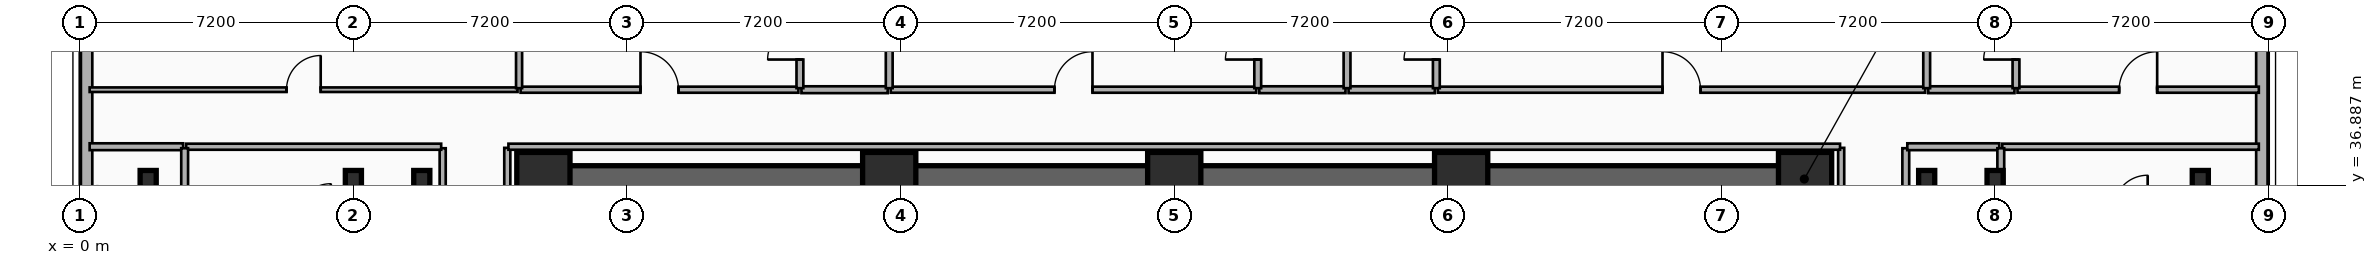
"""IFC4 building model, lengths in metres.
Left out: names, types, materials, properties, quantities, classifications, styles, units other than length and angle.
Written with IfcOpenShell. Run it as: python <this file> out.ifc"""

import sys

from ifc_helpers import new_model, si_unit, direction, frame, frame_2d, origin, origin_2d, place, context, subcontext, project, spatial, rectangle, i_section, extrude, element, fill, save


model = new_model("IFC4")
c1 = context("Model", 3, precision=1e-05, world=origin(), true_north=direction((0.0, 1.0)))
c2 = subcontext(c1, "Body", "Model", "MODEL_VIEW")
j1 = project(units=[si_unit("LENGTHUNIT", "METRE"), si_unit("PLANEANGLEUNIT", "RADIAN")], contexts=[c1])
p1 = place(None, origin())
s1 = spatial("IfcSite", under=j1, at=p1, CompositionType="ELEMENT")
p2 = place(p1, origin())
s2 = spatial("IfcBuilding", under=s1, at=p2, CompositionType="ELEMENT")
p3 = place(p2, frame((0.0, 0.0, 50.0)))
s3 = spatial("IfcBuildingStorey", under=s2, at=p3, CompositionType="ELEMENT", Elevation=50.0)
p4 = place(p3, frame((12.15, 37.05, 0.0), z_axis=(0.0, 0.0, 1.0), x_axis=(1.0, 0.0, 0.0)))
e1 = element("IfcWall", 1, at=p4, inside=s3, PredefinedType="SHEAR", context=c2, shape_type="SweptSolid", body=[
    extrude(rectangle(XDim=33.23, YDim=0.7, at=frame_2d((16.615, 0.0))), origin(), (0.0, 0.0, 1.0), 3.5),
])
for number, where, z_axis, x_axis in (
    (2, (12.2, 37.05, 0.0), (0.0, 0.0, 1.0), (1.0, 0.0, 0.0)),
    (3, (21.3, 37.05, 0.0), (0.0, 0.0, 1.0), (1.0, 0.0, 0.0)),
    (4, (28.8, 37.05, 0.0), (0.0, 0.0, 1.0), (1.0, 0.0, 0.0)),
    (5, (36.35, 37.05, 0.0), (0.0, 0.0, 1.0), (1.0, 0.0, 0.0)),
    (6, (45.4, 37.05, 0.0), (0.0, 0.0, 1.0), (1.0, 0.0, 0.0)),
):
    element("IfcColumn", number, at=place(p3, frame(where, z_axis=z_axis, x_axis=x_axis)), inside=s3, PredefinedType="COLUMN", context=c2, shape_type="SweptSolid", body=[
        extrude(rectangle(XDim=1.4, YDim=1.4, at=origin_2d()), origin(), (0.0, 0.0, 1.0), 3.5),
    ])
for number, where, z_axis, x_axis in (
    (7, (9.0, 37.05, 0.0), (0.0, 0.0, 1.0), (1.0, 0.0, 0.0)),
    (8, (48.6, 37.05, 0.0), (0.0, 0.0, 1.0), (1.0, 0.0, 0.0)),
    (9, (1.8, 37.05, 0.0), (0.0, 0.0, 1.0), (1.0, 0.0, 0.0)),
    (10, (7.2, 37.05, 0.0), (0.0, 0.0, 1.0), (1.0, 0.0, 0.0)),
    (11, (50.4, 37.05, 0.0), (0.0, 0.0, 1.0), (1.0, 0.0, 0.0)),
    (12, (55.8, 37.05, 0.0), (0.0, 0.0, 1.0), (1.0, 0.0, 0.0)),
):
    element("IfcColumn", number, at=place(p3, frame(where, z_axis=z_axis, x_axis=x_axis)), inside=s3, PredefinedType="COLUMN", context=c2, shape_type="SweptSolid", body=[
        extrude(i_section(OverallWidth=0.424, OverallDepth=0.45, WebThickness=0.041, FlangeThickness=0.065, FilletRadius=0.015, at=origin_2d()), origin(), (0.0, 0.0, 1.0), 3.5),
    ])
p5 = place(p3, frame((57.42, 41.0, 0.0), z_axis=(0.0, 0.0, 1.0), x_axis=(0.0, -1.0, 0.0)))
e13 = element("IfcWall", 13, at=p5, inside=s3, PredefinedType="SOLIDWALL", context=c2, shape_type="SweptSolid", body=[
    extrude(rectangle(XDim=15.2, YDim=0.3, at=frame_2d((7.6, 0.0))), origin(), (0.0, 0.0, 1.0), 3.24),
])
p6 = place(p5, frame((10.882, 0.0, 0.48)))
e14 = element("IfcOpeningElement", 14, at=p6, cuts=e13, PredefinedType="OPENING", context=c2, shape_type="SweptSolid", body=[
    extrude(rectangle(XDim=1.4, YDim=1.8, at=frame_2d((0.7, 0.9))), frame((0.0, 0.16, 0.0), z_axis=(0.0, -1.0, 0.0), x_axis=(1.0, 0.0, 0.0)), (0.0, 0.0, 1.0), 0.32),
])
p7 = place(p5, frame((5.621, 0.0, 0.48)))
e15 = element("IfcOpeningElement", 15, at=p7, cuts=e13, PredefinedType="OPENING", context=c2, shape_type="SweptSolid", body=[
    extrude(rectangle(XDim=1.4, YDim=1.8, at=frame_2d((0.7, 0.9))), frame((0.0, 0.16, 0.0), z_axis=(0.0, -1.0, 0.0), x_axis=(1.0, 0.0, 0.0)), (0.0, 0.0, 1.0), 0.32),
])
p8 = place(p3, frame((0.18, 25.8, 0.0), z_axis=(0.0, 0.0, 1.0), x_axis=(0.0, 1.0, 0.0)))
e16 = element("IfcWall", 16, at=p8, inside=s3, PredefinedType="SOLIDWALL", context=c2, shape_type="SweptSolid", body=[
    extrude(rectangle(XDim=15.2, YDim=0.3, at=frame_2d((7.6, 0.0))), origin(), (0.0, 0.0, 1.0), 3.24),
])
p9 = place(p8, frame((2.67, 0.0, 0.48)))
e17 = element("IfcOpeningElement", 17, at=p9, cuts=e16, PredefinedType="OPENING", context=c2, shape_type="SweptSolid", body=[
    extrude(rectangle(XDim=1.4, YDim=1.8, at=frame_2d((0.7, 0.9))), frame((0.0, 0.16, 0.0), z_axis=(0.0, -1.0, 0.0), x_axis=(1.0, 0.0, 0.0)), (0.0, 0.0, 1.0), 0.32),
])
p10 = place(p8, frame((7.709, 0.0, 0.48)))
e18 = element("IfcOpeningElement", 18, at=p10, cuts=e16, PredefinedType="OPENING", context=c2, shape_type="SweptSolid", body=[
    extrude(rectangle(XDim=1.4, YDim=1.8, at=frame_2d((0.7, 0.9))), frame((0.0, 0.16, 0.0), z_axis=(0.0, -1.0, 0.0), x_axis=(1.0, 0.0, 0.0)), (0.0, 0.0, 1.0), 0.32),
])
p11 = place(p3, frame((9.55, 36.067, 0.0), z_axis=(0.0, 0.0, 1.0), x_axis=(0.0, 1.0, 0.0)))
e19 = element("IfcWall", 19, at=p11, inside=s3, PredefinedType="PARTITIONING", context=c2, shape_type="SweptSolid", body=[
    extrude(rectangle(XDim=1.793, YDim=0.16, at=frame_2d((0.896, 0.0))), origin(), (0.0, 0.0, 1.0), 2.72),
])
p12 = place(p3, frame((48.05, 36.29, 0.0), z_axis=(0.0, 0.0, 1.0), x_axis=(0.0, 1.0, 0.0)))
e20 = element("IfcWall", 20, at=p12, inside=s3, PredefinedType="PLUMBINGWALL", context=c2, shape_type="SweptSolid", body=[
    extrude(rectangle(XDim=1.57, YDim=0.18, at=frame_2d((0.785, 0.0))), origin(), (0.0, 0.0, 1.0), 2.72),
])
p13 = place(p3, frame((0.26, 37.9, 0.0), z_axis=(0.0, 0.0, 1.0), x_axis=(1.0, 0.0, 0.0)))
e21 = element("IfcWall", 21, at=p13, inside=s3, PredefinedType="PLUMBINGWALL", context=c2, shape_type="SweptSolid", body=[
    extrude(rectangle(XDim=2.46, YDim=0.18, at=frame_2d((1.23, 0.0))), origin(), (0.0, 0.0, 1.0), 3.24),
])
p14 = place(p3, frame((2.8, 37.9, 0.0), z_axis=(0.0, 0.0, 1.0), x_axis=(1.0, 0.0, 0.0)))
e22 = element("IfcWall", 22, at=p14, inside=s3, PredefinedType="PARTITIONING", context=c2, shape_type="SweptSolid", body=[
    extrude(rectangle(XDim=6.71, YDim=0.16, at=frame_2d((3.355, 0.0))), origin(), (0.0, 0.0, 1.0), 3.24),
])
p15 = place(p3, frame((48.09, 37.9, 0.0), z_axis=(0.0, 0.0, 1.0), x_axis=(1.0, 0.0, 0.0)))
e23 = element("IfcWall", 23, at=p15, inside=s3, PredefinedType="PLUMBINGWALL", context=c2, shape_type="SweptSolid", body=[
    extrude(rectangle(XDim=2.42, YDim=0.18, at=frame_2d((1.21, 0.0))), origin(), (0.0, 0.0, 1.0), 3.24),
])
p16 = place(p3, frame((50.59, 37.9, 0.0), z_axis=(0.0, 0.0, 1.0), x_axis=(1.0, 0.0, 0.0)))
e24 = element("IfcWall", 24, at=p16, inside=s3, PredefinedType="PARTITIONING", context=c2, shape_type="SweptSolid", body=[
    extrude(rectangle(XDim=6.75, YDim=0.16, at=frame_2d((3.375, 0.0))), origin(), (0.0, 0.0, 1.0), 3.24),
])
p17 = place(p3, frame((0.26, 39.4, 0.0), z_axis=(0.0, 0.0, 1.0), x_axis=(1.0, 0.0, 0.0)))
e25 = element("IfcWall", 25, at=p17, inside=s3, PredefinedType="PARTITIONING", context=c2, shape_type="SweptSolid", body=[
    extrude(rectangle(XDim=11.26, YDim=0.12, at=frame_2d((5.63, 0.0))), origin(), (0.0, 0.0, 1.0), 3.24),
])
p18 = place(p17, frame((5.18, 0.0, 0.0)))
e26 = element("IfcOpeningElement", 26, at=p18, cuts=e25, PredefinedType="OPENING", context=c2, shape_type="SweptSolid", body=[
    extrude(rectangle(XDim=0.9, YDim=2.1, at=frame_2d((0.45, 1.05))), frame((0.0, 0.07, 0.0), z_axis=(0.0, -1.0, 0.0), x_axis=(1.0, 0.0, 0.0)), (0.0, 0.0, 1.0), 0.14),
])
p19 = place(p3, frame((11.6, 39.4, 0.0), z_axis=(0.0, 0.0, 1.0), x_axis=(1.0, 0.0, 0.0)))
e27 = element("IfcWall", 27, at=p19, inside=s3, PredefinedType="PARTITIONING", context=c2, shape_type="SweptSolid", body=[
    extrude(rectangle(XDim=7.31, YDim=0.16, at=frame_2d((3.655, 0.0))), origin(), (0.0, 0.0, 1.0), 3.24),
])
p20 = place(p19, frame((3.155, 0.0, 0.0)))
e28 = element("IfcOpeningElement", 28, at=p20, cuts=e27, PredefinedType="OPENING", context=c2, shape_type="SweptSolid", body=[
    extrude(rectangle(XDim=1.0, YDim=2.15, at=frame_2d((0.5, 1.075))), frame((0.0, 0.09, 0.0), z_axis=(0.0, -1.0, 0.0), x_axis=(1.0, 0.0, 0.0)), (0.0, 0.0, 1.0), 0.18),
])
p21 = place(p3, frame((18.99, 39.4, 0.0), z_axis=(0.0, 0.0, 1.0), x_axis=(1.0, 0.0, 0.0)))
e29 = element("IfcWall", 29, at=p21, inside=s3, PredefinedType="PLUMBINGWALL", context=c2, shape_type="SweptSolid", body=[
    extrude(rectangle(XDim=2.27, YDim=0.18, at=frame_2d((1.135, 0.0))), origin(), (0.0, 0.0, 1.0), 3.24),
])
p22 = place(p3, frame((21.34, 39.4, 0.0), z_axis=(0.0, 0.0, 1.0), x_axis=(1.0, 0.0, 0.0)))
e30 = element("IfcWall", 30, at=p22, inside=s3, PredefinedType="PARTITIONING", context=c2, shape_type="SweptSolid", body=[
    extrude(rectangle(XDim=9.617, YDim=0.16, at=frame_2d((4.809, 0.0))), origin(), (0.0, 0.0, 1.0), 3.24),
])
p23 = place(p22, frame((4.309, 0.0, 0.0)))
e31 = element("IfcOpeningElement", 31, at=p23, cuts=e30, PredefinedType="OPENING", context=c2, shape_type="SweptSolid", body=[
    extrude(rectangle(XDim=1.0, YDim=2.15, at=frame_2d((0.5, 1.075))), frame((0.0, 0.09, 0.0), z_axis=(0.0, -1.0, 0.0), x_axis=(1.0, 0.0, 0.0)), (0.0, 0.0, 1.0), 0.18),
])
p24 = place(p3, frame((31.037, 39.4, 0.0), z_axis=(0.0, 0.0, 1.0), x_axis=(1.0, 0.0, 0.0)))
e32 = element("IfcWall", 32, at=p24, inside=s3, PredefinedType="PLUMBINGWALL", context=c2, shape_type="SweptSolid", body=[
    extrude(rectangle(XDim=2.27, YDim=0.18, at=frame_2d((1.135, 0.0))), origin(), (0.0, 0.0, 1.0), 3.24),
])
p25 = place(p3, frame((35.737, 39.4, 0.0), z_axis=(0.0, 0.0, 1.0), x_axis=(1.0, 0.0, 0.0)))
e33 = element("IfcWall", 33, at=p25, inside=s3, PredefinedType="PARTITIONING", context=c2, shape_type="SweptSolid", body=[
    extrude(rectangle(XDim=12.823, YDim=0.16, at=frame_2d((6.412, 0.0))), origin(), (0.0, 0.0, 1.0), 3.24),
])
p26 = place(p25, frame((5.912, 0.0, 0.0)))
e34 = element("IfcOpeningElement", 34, at=p26, cuts=e33, PredefinedType="OPENING", context=c2, shape_type="SweptSolid", body=[
    extrude(rectangle(XDim=1.0, YDim=2.15, at=frame_2d((0.5, 1.075))), frame((0.0, 0.09, 0.0), z_axis=(0.0, -1.0, 0.0), x_axis=(1.0, 0.0, 0.0)), (0.0, 0.0, 1.0), 0.18),
])
p27 = place(p3, frame((33.387, 39.4, 0.0), z_axis=(0.0, 0.0, 1.0), x_axis=(1.0, 0.0, 0.0)))
e35 = element("IfcWall", 35, at=p27, inside=s3, PredefinedType="PLUMBINGWALL", context=c2, shape_type="SweptSolid", body=[
    extrude(rectangle(XDim=2.27, YDim=0.18, at=frame_2d((1.135, 0.0))), origin(), (0.0, 0.0, 1.0), 3.24),
])
p28 = place(p3, frame((50.99, 39.4, 0.0), z_axis=(0.0, 0.0, 1.0), x_axis=(1.0, 0.0, 0.0)))
e36 = element("IfcWall", 36, at=p28, inside=s3, PredefinedType="PARTITIONING", context=c2, shape_type="SweptSolid", body=[
    extrude(rectangle(XDim=6.35, YDim=0.16, at=frame_2d((3.175, 0.0))), origin(), (0.0, 0.0, 1.0), 3.24),
])
p29 = place(p28, frame((2.675, 0.0, 0.0)))
e37 = element("IfcOpeningElement", 37, at=p29, cuts=e36, PredefinedType="OPENING", context=c2, shape_type="SweptSolid", body=[
    extrude(rectangle(XDim=1.0, YDim=2.15, at=frame_2d((0.5, 1.075))), frame((0.0, 0.09, 0.0), z_axis=(0.0, -1.0, 0.0), x_axis=(1.0, 0.0, 0.0)), (0.0, 0.0, 1.0), 0.18),
])
p30 = place(p3, frame((48.64, 39.4, 0.0), z_axis=(0.0, 0.0, 1.0), x_axis=(1.0, 0.0, 0.0)))
e38 = element("IfcWall", 38, at=p30, inside=s3, PredefinedType="PLUMBINGWALL", context=c2, shape_type="SweptSolid", body=[
    extrude(rectangle(XDim=2.27, YDim=0.18, at=frame_2d((1.135, 0.0))), origin(), (0.0, 0.0, 1.0), 3.24),
])
p31 = place(p3, frame((2.76, 36.067, 0.0), z_axis=(0.0, 0.0, 1.0), x_axis=(0.0, 1.0, 0.0)))
e39 = element("IfcWall", 39, at=p31, inside=s3, PredefinedType="PLUMBINGWALL", context=c2, shape_type="SweptSolid", body=[
    extrude(rectangle(XDim=1.793, YDim=0.18, at=frame_2d((0.896, 0.0))), origin(), (0.0, 0.0, 1.0), 2.72),
])
p32 = place(p3, frame((50.55, 36.29, 0.0), z_axis=(0.0, 0.0, 1.0), x_axis=(0.0, 1.0, 0.0)))
e40 = element("IfcWall", 40, at=p32, inside=s3, PredefinedType="PLUMBINGWALL", context=c2, shape_type="SweptSolid", body=[
    extrude(rectangle(XDim=1.57, YDim=0.18, at=frame_2d((0.785, 0.0))), origin(), (0.0, 0.0, 1.0), 2.57),
])
p33 = place(p3, frame((11.56, 39.44, 0.0), z_axis=(0.0, 0.0, 1.0), x_axis=(0.0, 1.0, 0.0)))
e41 = element("IfcWall", 41, at=p33, inside=s3, PredefinedType="PARTITIONING", context=c2, shape_type="SweptSolid", body=[
    extrude(rectangle(XDim=5.5, YDim=0.16, at=frame_2d((2.75, 0.0))), origin(), (0.0, 0.0, 1.0), 3.24),
])
p34 = place(p3, frame((18.95, 39.44, 0.0), z_axis=(0.0, 0.0, 1.0), x_axis=(0.0, 1.0, 0.0)))
e42 = element("IfcWall", 42, at=p34, inside=s3, PredefinedType="PLUMBINGWALL", context=c2, shape_type="SweptSolid", body=[
    extrude(rectangle(XDim=2.358, YDim=0.18, at=frame_2d((1.179, 0.0))), origin(), (0.0, 0.0, 1.0), 3.24),
])
p35 = place(p34, frame((0.754, 0.0, 0.0)))
e43 = element("IfcOpeningElement", 43, at=p35, cuts=e42, PredefinedType="OPENING", context=c2, shape_type="SweptSolid", body=[
    extrude(rectangle(XDim=0.85, YDim=2.1, at=frame_2d((0.425, 1.05))), frame((0.0, 0.1, 0.0), z_axis=(0.0, -1.0, 0.0), x_axis=(1.0, 0.0, 0.0)), (0.0, 0.0, 1.0), 0.2),
])
p36 = place(p3, frame((21.3, 39.44, 0.0), z_axis=(0.0, 0.0, 1.0), x_axis=(0.0, 1.0, 0.0)))
e44 = element("IfcWall", 44, at=p36, inside=s3, PredefinedType="PLUMBINGWALL", context=c2, shape_type="SweptSolid", body=[
    extrude(rectangle(XDim=2.358, YDim=0.18, at=frame_2d((1.179, 0.0))), origin(), (0.0, 0.0, 1.0), 3.24),
])
p37 = place(p3, frame((30.997, 39.44, 0.0), z_axis=(0.0, 0.0, 1.0), x_axis=(0.0, 1.0, 0.0)))
e45 = element("IfcWall", 45, at=p37, inside=s3, PredefinedType="PLUMBINGWALL", context=c2, shape_type="SweptSolid", body=[
    extrude(rectangle(XDim=2.358, YDim=0.18, at=frame_2d((1.179, 0.0))), origin(), (0.0, 0.0, 1.0), 3.24),
])
p38 = place(p37, frame((0.754, 0.0, 0.0)))
e46 = element("IfcOpeningElement", 46, at=p38, cuts=e45, PredefinedType="OPENING", context=c2, shape_type="SweptSolid", body=[
    extrude(rectangle(XDim=0.85, YDim=2.1, at=frame_2d((0.425, 1.05))), frame((0.0, 0.1, 0.0), z_axis=(0.0, -1.0, 0.0), x_axis=(1.0, 0.0, 0.0)), (0.0, 0.0, 1.0), 0.2),
])
p39 = place(p3, frame((33.347, 39.44, 0.0), z_axis=(0.0, 0.0, 1.0), x_axis=(0.0, 1.0, 0.0)))
e47 = element("IfcWall", 47, at=p39, inside=s3, PredefinedType="PLUMBINGWALL", context=c2, shape_type="SweptSolid", body=[
    extrude(rectangle(XDim=2.358, YDim=0.18, at=frame_2d((1.179, 0.0))), origin(), (0.0, 0.0, 1.0), 3.24),
])
p40 = place(p3, frame((35.697, 39.44, 0.0), z_axis=(0.0, 0.0, 1.0), x_axis=(0.0, 1.0, 0.0)))
e48 = element("IfcWall", 48, at=p40, inside=s3, PredefinedType="PLUMBINGWALL", context=c2, shape_type="SweptSolid", body=[
    extrude(rectangle(XDim=2.358, YDim=0.18, at=frame_2d((1.179, 0.0))), origin(), (0.0, 0.0, 1.0), 3.24),
])
p41 = place(p40, frame((0.754, 0.0, 0.0)))
e49 = element("IfcOpeningElement", 49, at=p41, cuts=e48, PredefinedType="OPENING", context=c2, shape_type="SweptSolid", body=[
    extrude(rectangle(XDim=0.85, YDim=2.1, at=frame_2d((0.425, 1.05))), frame((0.0, 0.1, 0.0), z_axis=(0.0, -1.0, 0.0), x_axis=(1.0, 0.0, 0.0)), (0.0, 0.0, 1.0), 0.2),
])
p42 = place(p3, frame((48.6, 39.44, 0.0), z_axis=(0.0, 0.0, 1.0), x_axis=(0.0, 1.0, 0.0)))
e50 = element("IfcWall", 50, at=p42, inside=s3, PredefinedType="PLUMBINGWALL", context=c2, shape_type="SweptSolid", body=[
    extrude(rectangle(XDim=2.358, YDim=0.18, at=frame_2d((1.179, 0.0))), origin(), (0.0, 0.0, 1.0), 3.24),
])
p43 = place(p3, frame((50.95, 39.44, 0.0), z_axis=(0.0, 0.0, 1.0), x_axis=(0.0, 1.0, 0.0)))
e51 = element("IfcWall", 51, at=p43, inside=s3, PredefinedType="PLUMBINGWALL", context=c2, shape_type="SweptSolid", body=[
    extrude(rectangle(XDim=2.358, YDim=0.18, at=frame_2d((1.179, 0.0))), origin(), (0.0, 0.0, 1.0), 3.24),
])
p44 = place(p43, frame((0.754, 0.0, 0.0)))
e52 = element("IfcOpeningElement", 52, at=p44, cuts=e51, PredefinedType="OPENING", context=c2, shape_type="SweptSolid", body=[
    extrude(rectangle(XDim=0.85, YDim=2.1, at=frame_2d((0.425, 1.05))), frame((0.0, 0.1, 0.0), z_axis=(0.0, -1.0, 0.0), x_axis=(1.0, 0.0, 0.0)), (0.0, 0.0, 1.0), 0.2),
])
for number, where, z_axis, x_axis in (
    (53, (11.25, 27.63, 0.0), (0.0, 0.0, 1.0), (0.0, 1.0, 0.0)),
    (54, (46.35, 27.63, 0.0), (0.0, 0.0, 1.0), (0.0, 1.0, 0.0)),
):
    element("IfcWall", number, at=place(p3, frame(where, z_axis=z_axis, x_axis=x_axis)), inside=s3, PredefinedType="PARTITIONING", context=c2, shape_type="SweptSolid", body=[
        extrude(rectangle(XDim=10.24, YDim=0.16, at=frame_2d((5.12, 0.0))), origin(), (0.0, 0.0, 1.0), 2.72),
    ])
p45 = place(p3, frame((11.28, 37.9, 0.0), z_axis=(0.0, 0.0, 1.0), x_axis=(1.0, 0.0, 0.0)))
e55 = element("IfcWall", 55, at=p45, inside=s3, PredefinedType="PARTITIONING", context=c2, shape_type="SweptSolid", body=[
    extrude(rectangle(XDim=35.04, YDim=0.16, at=frame_2d((17.52, 0.0))), origin(), (0.0, 0.0, 1.0), 3.24),
])
p46 = place(p18, origin())
e56 = element("IfcDoor", 56, at=p46, inside=s3, OperationType="SINGLE_SWING_RIGHT", PredefinedType="DOOR", context=c2, shape_type="SweptSolid", body=[
    extrude(rectangle(XDim=0.9, YDim=2.1, at=frame_2d((0.45, 1.05))), frame((0.0, 0.025, 0.0), z_axis=(0.0, -1.0, 0.0), x_axis=(1.0, 0.0, 0.0)), (0.0, 0.0, 1.0), 0.05),
])
fill(e26, e56)
p47 = place(p20, origin())
e57 = element("IfcDoor", 57, at=p47, inside=s3, OperationType="SINGLE_SWING_LEFT", PredefinedType="DOOR", context=c2, shape_type="SweptSolid", body=[
    extrude(rectangle(XDim=1.0, YDim=2.15, at=frame_2d((0.5, 1.075))), frame((0.0, 0.025, 0.0), z_axis=(0.0, -1.0, 0.0), x_axis=(1.0, 0.0, 0.0)), (0.0, 0.0, 1.0), 0.05),
])
fill(e28, e57)
p48 = place(p23, origin())
e58 = element("IfcDoor", 58, at=p48, inside=s3, OperationType="SINGLE_SWING_RIGHT", PredefinedType="DOOR", context=c2, shape_type="SweptSolid", body=[
    extrude(rectangle(XDim=1.0, YDim=2.15, at=frame_2d((0.5, 1.075))), frame((0.0, 0.025, 0.0), z_axis=(0.0, -1.0, 0.0), x_axis=(1.0, 0.0, 0.0)), (0.0, 0.0, 1.0), 0.05),
])
fill(e31, e58)
p49 = place(p26, origin())
e59 = element("IfcDoor", 59, at=p49, inside=s3, OperationType="SINGLE_SWING_LEFT", PredefinedType="DOOR", context=c2, shape_type="SweptSolid", body=[
    extrude(rectangle(XDim=1.0, YDim=2.15, at=frame_2d((0.5, 1.075))), frame((0.0, 0.025, 0.0), z_axis=(0.0, -1.0, 0.0), x_axis=(1.0, 0.0, 0.0)), (0.0, 0.0, 1.0), 0.05),
])
fill(e34, e59)
p50 = place(p29, origin())
e60 = element("IfcDoor", 60, at=p50, inside=s3, OperationType="SINGLE_SWING_RIGHT", PredefinedType="DOOR", context=c2, shape_type="SweptSolid", body=[
    extrude(rectangle(XDim=1.0, YDim=2.15, at=frame_2d((0.5, 1.075))), frame((0.0, 0.025, 0.0), z_axis=(0.0, -1.0, 0.0), x_axis=(1.0, 0.0, 0.0)), (0.0, 0.0, 1.0), 0.05),
])
fill(e37, e60)
p51 = place(p35, origin())
e61 = element("IfcDoor", 61, at=p51, inside=s3, OperationType="SINGLE_SWING_LEFT", PredefinedType="DOOR", context=c2, shape_type="SweptSolid", body=[
    extrude(rectangle(XDim=0.85, YDim=2.1, at=frame_2d((0.425, 1.05))), frame((0.0, 0.025, 0.0), z_axis=(0.0, -1.0, 0.0), x_axis=(1.0, 0.0, 0.0)), (0.0, 0.0, 1.0), 0.05),
])
fill(e43, e61)
p52 = place(p38, origin())
e62 = element("IfcDoor", 62, at=p52, inside=s3, OperationType="SINGLE_SWING_LEFT", PredefinedType="DOOR", context=c2, shape_type="SweptSolid", body=[
    extrude(rectangle(XDim=0.85, YDim=2.1, at=frame_2d((0.425, 1.05))), frame((0.0, 0.025, 0.0), z_axis=(0.0, -1.0, 0.0), x_axis=(1.0, 0.0, 0.0)), (0.0, 0.0, 1.0), 0.05),
])
fill(e46, e62)
p53 = place(p41, origin())
e63 = element("IfcDoor", 63, at=p53, inside=s3, OperationType="SINGLE_SWING_LEFT", PredefinedType="DOOR", context=c2, shape_type="SweptSolid", body=[
    extrude(rectangle(XDim=0.85, YDim=2.1, at=frame_2d((0.425, 1.05))), frame((0.0, 0.025, 0.0), z_axis=(0.0, -1.0, 0.0), x_axis=(1.0, 0.0, 0.0)), (0.0, 0.0, 1.0), 0.05),
])
fill(e49, e63)
p54 = place(p44, origin())
e64 = element("IfcDoor", 64, at=p54, inside=s3, OperationType="SINGLE_SWING_LEFT", PredefinedType="DOOR", context=c2, shape_type="SweptSolid", body=[
    extrude(rectangle(XDim=0.85, YDim=2.1, at=frame_2d((0.425, 1.05))), frame((0.0, 0.025, 0.0), z_axis=(0.0, -1.0, 0.0), x_axis=(1.0, 0.0, 0.0)), (0.0, 0.0, 1.0), 0.05),
])
fill(e52, e64)
save(model, sys.argv[1])
